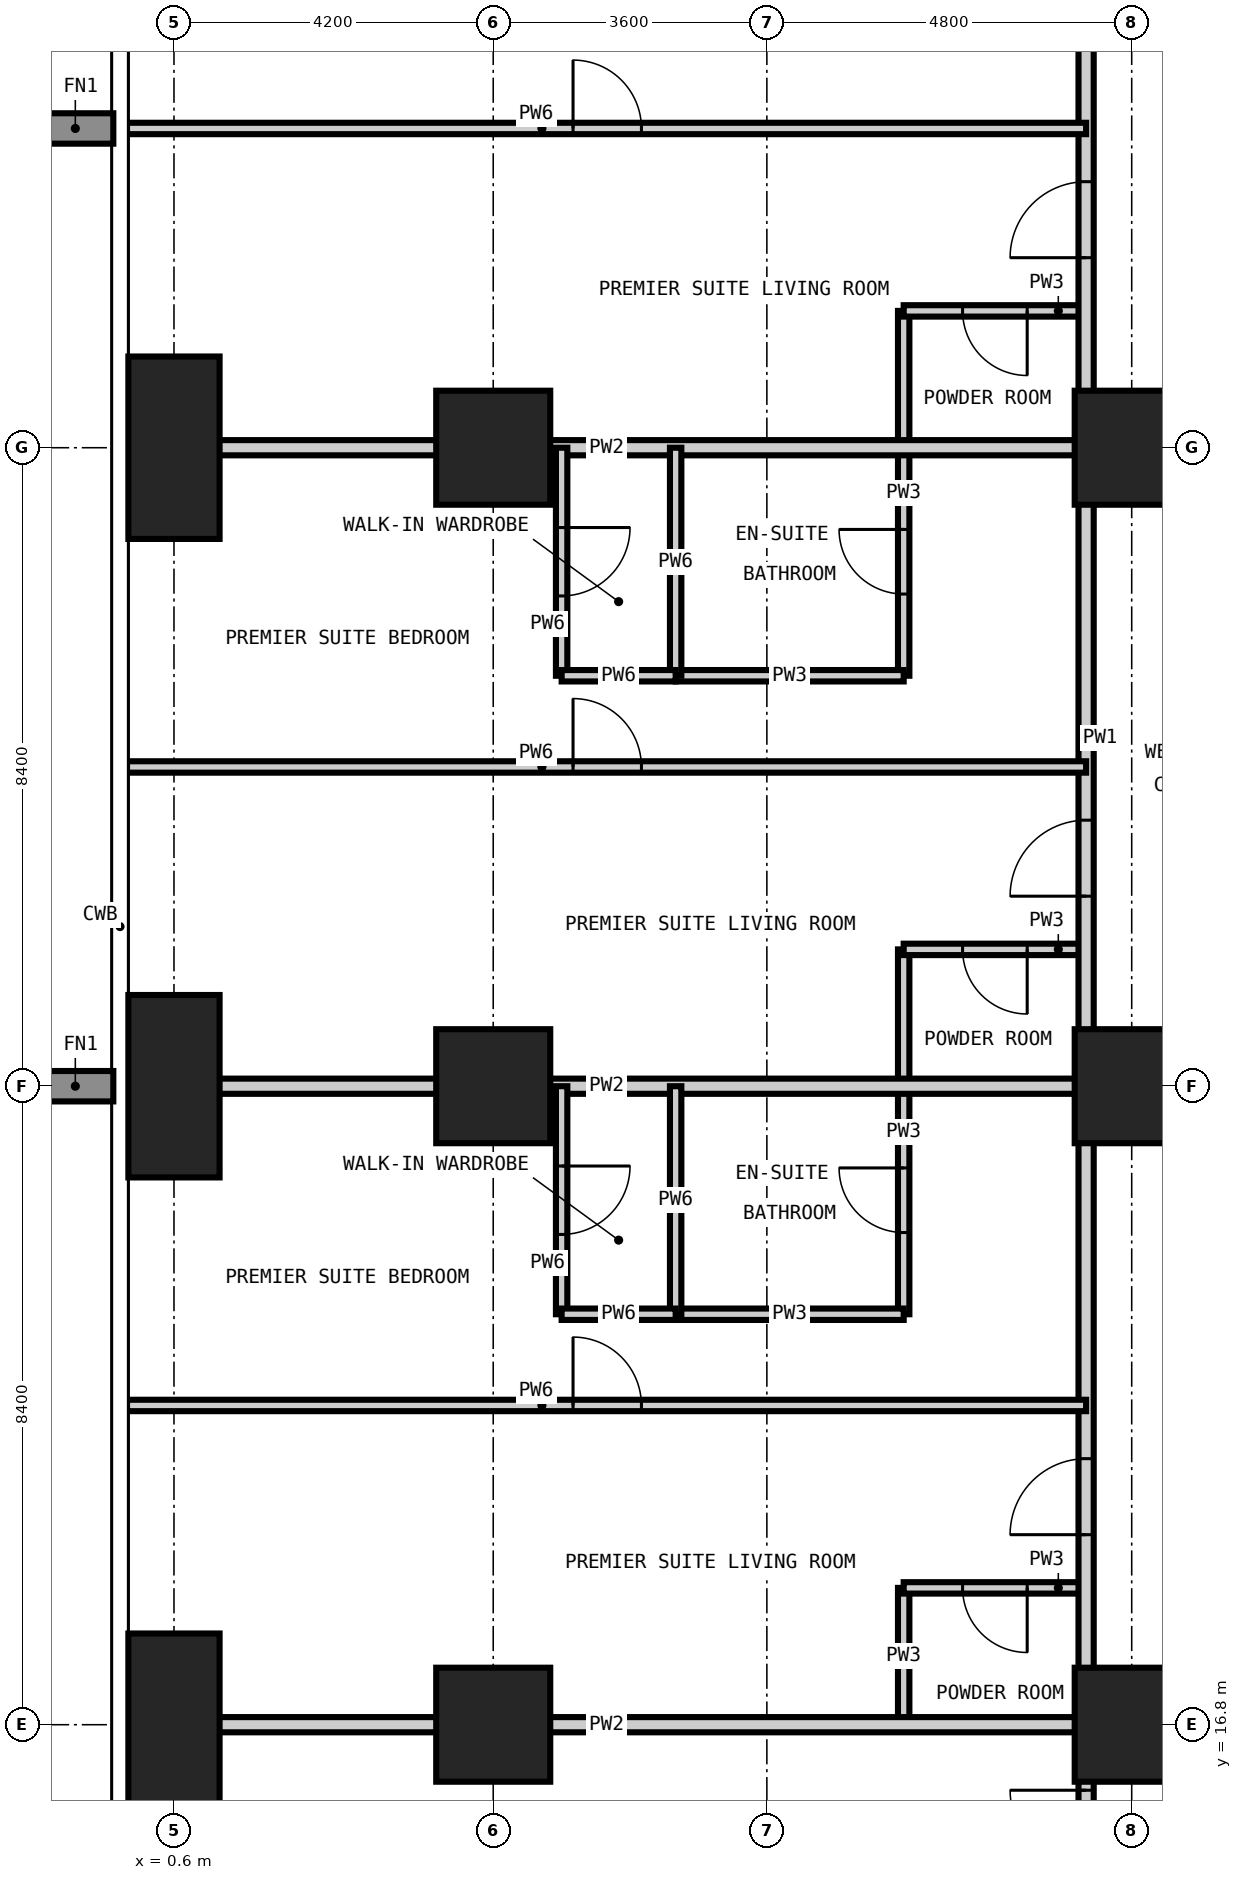
"""IFC4 building model, lengths in metres.
Left out: names, types, materials, properties, quantities, classifications, styles, units other than length and angle.
Written with IfcOpenShell. Run it as: python <this file> out.ifc"""

import sys

from ifc_helpers import new_model, si_unit, direction, frame, frame_2d, origin, origin_2d, place, context, subcontext, project, spatial, rectangle, extrude, element, fill, save


model = new_model("IFC4")
c1 = context("Model", 3, precision=1e-05, world=origin(), true_north=direction((0.0, 1.0)))
c2 = subcontext(c1, "Body", "Model", "MODEL_VIEW")
j1 = project(units=[si_unit("LENGTHUNIT", "METRE"), si_unit("PLANEANGLEUNIT", "RADIAN")], contexts=[c1])
p1 = place(None, origin())
s1 = spatial("IfcSite", under=j1, at=p1, CompositionType="ELEMENT")
p2 = place(p1, origin())
s2 = spatial("IfcBuilding", under=s1, at=p2, CompositionType="ELEMENT")
p3 = place(p2, frame((0.0, 0.0, 100.8)))
s3 = spatial("IfcBuildingStorey", under=s2, at=p3, CompositionType="ELEMENT", Elevation=100.8)
for number, where, z_axis, x_axis in (
    (1, (0.6, 16.8, -0.35), (0.0, 0.0, 1.0), (1.0, 0.0, 0.0)),
    (2, (0.6, 25.2, -0.35), (0.0, 0.0, 1.0), (1.0, 0.0, 0.0)),
    (3, (0.6, 33.6, -0.35), (0.0, 0.0, 1.0), (1.0, 0.0, 0.0)),
):
    element("IfcColumn", number, at=place(p3, frame(where, z_axis=z_axis, x_axis=x_axis)), inside=s3, PredefinedType="COLUMN", context=c2, shape_type="SweptSolid", body=[
        extrude(rectangle(XDim=1.2, YDim=2.4, at=origin_2d()), origin(), (0.0, 0.0, 1.0), 3.6),
    ])
for number, where, z_axis, x_axis in (
    (4, (4.8, 16.8, -0.35), (0.0, 0.0, 1.0), (1.0, 0.0, 0.0)),
    (5, (4.8, 25.2, -0.35), (0.0, 0.0, 1.0), (1.0, 0.0, 0.0)),
    (6, (4.8, 33.6, -0.35), (0.0, 0.0, 1.0), (1.0, 0.0, 0.0)),
    (7, (13.2, 16.8, -0.35), (0.0, 0.0, 1.0), (1.0, 0.0, 0.0)),
    (8, (13.2, 25.2, -0.35), (0.0, 0.0, 1.0), (1.0, 0.0, 0.0)),
    (9, (13.2, 33.6, -0.35), (0.0, 0.0, 1.0), (1.0, 0.0, 0.0)),
):
    element("IfcColumn", number, at=place(p3, frame(where, z_axis=z_axis, x_axis=x_axis)), inside=s3, PredefinedType="COLUMN", context=c2, shape_type="SweptSolid", body=[
        extrude(rectangle(XDim=1.5, YDim=1.5, at=origin_2d()), origin(), (0.0, 0.0, 1.0), 3.6),
    ])
p4 = place(p3, frame((10.2, 16.8, 0.0), z_axis=(0.0, 0.0, 1.0), x_axis=(0.0, 1.0, 0.0)))
e10 = element("IfcWall", 10, at=p4, inside=s3, PredefinedType="PARTITIONING", context=c2, shape_type="SweptSolid", body=[
    extrude(rectangle(XDim=1.8, YDim=0.15, at=frame_2d((0.9, 0.0))), origin(), (0.0, 0.0, 1.0), 3.25),
])
p5 = place(p3, frame((10.2, 22.2, 0.0), z_axis=(0.0, 0.0, 1.0), x_axis=(0.0, 1.0, 0.0)))
e11 = element("IfcWall", 11, at=p5, inside=s3, PredefinedType="PARTITIONING", context=c2, shape_type="SweptSolid", body=[
    extrude(rectangle(XDim=4.8, YDim=0.15, at=frame_2d((2.4, 0.0))), origin(), (0.0, 0.0, 1.0), 3.25),
])
p6 = place(p5, frame((1.075, 0.0, 0.0)))
e12 = element("IfcOpeningElement", 12, at=p6, cuts=e11, PredefinedType="OPENING", context=c2, shape_type="SweptSolid", body=[
    extrude(rectangle(XDim=0.85, YDim=2.1, at=frame_2d((0.425, 1.05))), frame((0.0, 0.085, 0.0), z_axis=(0.0, -1.0, 0.0), x_axis=(1.0, 0.0, 0.0)), (0.0, 0.0, 1.0), 0.17),
])
p7 = place(p3, frame((10.2, 30.6, 0.0), z_axis=(0.0, 0.0, 1.0), x_axis=(0.0, 1.0, 0.0)))
e13 = element("IfcWall", 13, at=p7, inside=s3, PredefinedType="PARTITIONING", context=c2, shape_type="SweptSolid", body=[
    extrude(rectangle(XDim=4.8, YDim=0.15, at=frame_2d((2.4, 0.0))), origin(), (0.0, 0.0, 1.0), 3.25),
])
p8 = place(p7, frame((1.075, 0.0, 0.0)))
e14 = element("IfcOpeningElement", 14, at=p8, cuts=e13, PredefinedType="OPENING", context=c2, shape_type="SweptSolid", body=[
    extrude(rectangle(XDim=0.85, YDim=2.1, at=frame_2d((0.425, 1.05))), frame((0.0, 0.085, 0.0), z_axis=(0.0, -1.0, 0.0), x_axis=(1.0, 0.0, 0.0)), (0.0, 0.0, 1.0), 0.17),
])
p9 = place(p3, frame((10.2, 18.6, 0.0), z_axis=(0.0, 0.0, 1.0), x_axis=(1.0, 0.0, 0.0)))
e15 = element("IfcWall", 15, at=p9, inside=s3, PredefinedType="PARTITIONING", context=c2, shape_type="SweptSolid", body=[
    extrude(rectangle(XDim=2.4, YDim=0.15, at=frame_2d((1.2, 0.0))), origin(), (0.0, 0.0, 1.0), 3.25),
])
p10 = place(p9, frame((0.775, 0.0, 0.0)))
e16 = element("IfcOpeningElement", 16, at=p10, cuts=e15, PredefinedType="OPENING", context=c2, shape_type="SweptSolid", body=[
    extrude(rectangle(XDim=0.85, YDim=2.1, at=frame_2d((0.425, 1.05))), frame((0.0, 0.085, 0.0), z_axis=(0.0, -1.0, 0.0), x_axis=(1.0, 0.0, 0.0)), (0.0, 0.0, 1.0), 0.17),
])
p11 = place(p3, frame((7.2, 22.2, 0.0), z_axis=(0.0, 0.0, 1.0), x_axis=(1.0, 0.0, 0.0)))
e17 = element("IfcWall", 17, at=p11, inside=s3, PredefinedType="PARTITIONING", context=c2, shape_type="SweptSolid", body=[
    extrude(rectangle(XDim=3.0, YDim=0.15, at=frame_2d((1.5, 0.0))), origin(), (0.0, 0.0, 1.0), 3.25),
])
p12 = place(p3, frame((10.2, 27.0, 0.0), z_axis=(0.0, 0.0, 1.0), x_axis=(1.0, 0.0, 0.0)))
e18 = element("IfcWall", 18, at=p12, inside=s3, PredefinedType="PARTITIONING", context=c2, shape_type="SweptSolid", body=[
    extrude(rectangle(XDim=2.4, YDim=0.15, at=frame_2d((1.2, 0.0))), origin(), (0.0, 0.0, 1.0), 3.25),
])
p13 = place(p12, frame((0.775, 0.0, 0.0)))
e19 = element("IfcOpeningElement", 19, at=p13, cuts=e18, PredefinedType="OPENING", context=c2, shape_type="SweptSolid", body=[
    extrude(rectangle(XDim=0.85, YDim=2.1, at=frame_2d((0.425, 1.05))), frame((0.0, 0.085, 0.0), z_axis=(0.0, -1.0, 0.0), x_axis=(1.0, 0.0, 0.0)), (0.0, 0.0, 1.0), 0.17),
])
p14 = place(p3, frame((7.2, 30.6, 0.0), z_axis=(0.0, 0.0, 1.0), x_axis=(1.0, 0.0, 0.0)))
e20 = element("IfcWall", 20, at=p14, inside=s3, PredefinedType="PARTITIONING", context=c2, shape_type="SweptSolid", body=[
    extrude(rectangle(XDim=3.0, YDim=0.15, at=frame_2d((1.5, 0.0))), origin(), (0.0, 0.0, 1.0), 3.25),
])
p15 = place(p3, frame((10.2, 35.4, 0.0), z_axis=(0.0, 0.0, 1.0), x_axis=(1.0, 0.0, 0.0)))
e21 = element("IfcWall", 21, at=p15, inside=s3, PredefinedType="PARTITIONING", context=c2, shape_type="SweptSolid", body=[
    extrude(rectangle(XDim=2.4, YDim=0.15, at=frame_2d((1.2, 0.0))), origin(), (0.0, 0.0, 1.0), 3.25),
])
p16 = place(p15, frame((0.775, 0.0, 0.0)))
e22 = element("IfcOpeningElement", 22, at=p16, cuts=e21, PredefinedType="OPENING", context=c2, shape_type="SweptSolid", body=[
    extrude(rectangle(XDim=0.85, YDim=2.1, at=frame_2d((0.425, 1.05))), frame((0.0, 0.085, 0.0), z_axis=(0.0, -1.0, 0.0), x_axis=(1.0, 0.0, 0.0)), (0.0, 0.0, 1.0), 0.17),
])
p17 = place(p3, frame((12.6, 14.075, 0.0), z_axis=(0.0, 0.0, 1.0), x_axis=(0.0, 1.0, 0.0)))
e23 = element("IfcWall", 23, at=p17, inside=s3, PredefinedType="PARTITIONING", context=c2, shape_type="SweptSolid", body=[
    extrude(rectangle(XDim=31.25, YDim=0.2, at=frame_2d((15.625, 0.0))), origin(), (0.0, 0.0, 1.0), 3.25),
])
p18 = place(p17, frame((5.225, 0.0, 0.0)))
e24 = element("IfcOpeningElement", 24, at=p18, cuts=e23, PredefinedType="OPENING", context=c2, shape_type="SweptSolid", body=[
    extrude(rectangle(XDim=1.0, YDim=2.2, at=frame_2d((0.5, 1.1))), frame((0.0, 0.11, 0.0), z_axis=(0.0, -1.0, 0.0), x_axis=(1.0, 0.0, 0.0)), (0.0, 0.0, 1.0), 0.22),
])
p19 = place(p17, frame((13.625, 0.0, 0.0)))
e25 = element("IfcOpeningElement", 25, at=p19, cuts=e23, PredefinedType="OPENING", context=c2, shape_type="SweptSolid", body=[
    extrude(rectangle(XDim=1.0, YDim=2.2, at=frame_2d((0.5, 1.1))), frame((0.0, 0.11, 0.0), z_axis=(0.0, -1.0, 0.0), x_axis=(1.0, 0.0, 0.0)), (0.0, 0.0, 1.0), 0.22),
])
p20 = place(p17, frame((22.025, 0.0, 0.0)))
e26 = element("IfcOpeningElement", 26, at=p20, cuts=e23, PredefinedType="OPENING", context=c2, shape_type="SweptSolid", body=[
    extrude(rectangle(XDim=1.0, YDim=2.2, at=frame_2d((0.5, 1.1))), frame((0.0, 0.11, 0.0), z_axis=(0.0, -1.0, 0.0), x_axis=(1.0, 0.0, 0.0)), (0.0, 0.0, 1.0), 0.22),
])
p21 = place(p17, frame((0.863, 0.0, 0.0)))
e27 = element("IfcOpeningElement", 27, at=p21, cuts=e23, PredefinedType="OPENING", context=c2, shape_type="SweptSolid", body=[
    extrude(rectangle(XDim=1.0, YDim=2.2, at=frame_2d((0.5, 1.1))), frame((0.0, 0.11, 0.0), z_axis=(0.0, -1.0, 0.0), x_axis=(1.0, 0.0, 0.0)), (0.0, 0.0, 1.0), 0.22),
])
p22 = place(p17, frame((29.088, 0.0, 0.0)))
e28 = element("IfcOpeningElement", 28, at=p22, cuts=e23, PredefinedType="OPENING", context=c2, shape_type="SweptSolid", body=[
    extrude(rectangle(XDim=1.0, YDim=2.2, at=frame_2d((0.5, 1.1))), frame((0.0, 0.11, 0.0), z_axis=(0.0, -1.0, 0.0), x_axis=(1.0, 0.0, 0.0)), (0.0, 0.0, 1.0), 0.22),
])
for number, where, z_axis, x_axis in (
    (29, (-0.018, 16.8, 0.0), (0.0, 0.0, 1.0), (1.0, 0.0, 0.0)),
    (30, (-0.018, 25.2, 0.0), (0.0, 0.0, 1.0), (1.0, 0.0, 0.0)),
    (31, (-0.018, 33.6, 0.0), (0.0, 0.0, 1.0), (1.0, 0.0, 0.0)),
):
    element("IfcWall", number, at=place(p3, frame(where, z_axis=z_axis, x_axis=x_axis)), inside=s3, PredefinedType="PARTITIONING", context=c2, shape_type="SweptSolid", body=[
        extrude(rectangle(XDim=12.618, YDim=0.2, at=frame_2d((6.309, 0.0))), origin(), (0.0, 0.0, 1.0), 3.25),
    ])
p23 = place(p3, frame((5.7, 22.2, 0.0), z_axis=(0.0, 0.0, 1.0), x_axis=(0.0, 1.0, 0.0)))
e32 = element("IfcWall", 32, at=p23, inside=s3, PredefinedType="PARTITIONING", context=c2, shape_type="SweptSolid", body=[
    extrude(rectangle(XDim=3.0, YDim=0.15, at=frame_2d((1.5, 0.0))), origin(), (0.0, 0.0, 1.0), 3.25),
])
p24 = place(p23, frame((1.05, 0.0, 0.0)))
e33 = element("IfcOpeningElement", 33, at=p24, cuts=e32, PredefinedType="OPENING", context=c2, shape_type="SweptSolid", body=[
    extrude(rectangle(XDim=0.9, YDim=2.1, at=frame_2d((0.45, 1.05))), frame((0.0, 0.085, 0.0), z_axis=(0.0, -1.0, 0.0), x_axis=(1.0, 0.0, 0.0)), (0.0, 0.0, 1.0), 0.17),
])
p25 = place(p3, frame((5.7, 30.6, 0.0), z_axis=(0.0, 0.0, 1.0), x_axis=(0.0, 1.0, 0.0)))
e34 = element("IfcWall", 34, at=p25, inside=s3, PredefinedType="PARTITIONING", context=c2, shape_type="SweptSolid", body=[
    extrude(rectangle(XDim=3.0, YDim=0.15, at=frame_2d((1.5, 0.0))), origin(), (0.0, 0.0, 1.0), 3.25),
])
p26 = place(p25, frame((1.05, 0.0, 0.0)))
e35 = element("IfcOpeningElement", 35, at=p26, cuts=e34, PredefinedType="OPENING", context=c2, shape_type="SweptSolid", body=[
    extrude(rectangle(XDim=0.9, YDim=2.1, at=frame_2d((0.45, 1.05))), frame((0.0, 0.085, 0.0), z_axis=(0.0, -1.0, 0.0), x_axis=(1.0, 0.0, 0.0)), (0.0, 0.0, 1.0), 0.17),
])
for number, where, z_axis, x_axis in (
    (36, (7.2, 22.2, 0.0), (0.0, 0.0, 1.0), (0.0, 1.0, 0.0)),
    (37, (7.2, 30.6, 0.0), (0.0, 0.0, 1.0), (0.0, 1.0, 0.0)),
):
    element("IfcWall", number, at=place(p3, frame(where, z_axis=z_axis, x_axis=x_axis)), inside=s3, PredefinedType="PARTITIONING", context=c2, shape_type="SweptSolid", body=[
        extrude(rectangle(XDim=3.0, YDim=0.15, at=frame_2d((1.5, 0.0))), origin(), (0.0, 0.0, 1.0), 3.25),
    ])
p27 = place(p3, frame((-0.018, 21.0, 0.0), z_axis=(0.0, 0.0, 1.0), x_axis=(1.0, 0.0, 0.0)))
e38 = element("IfcWall", 38, at=p27, inside=s3, PredefinedType="PARTITIONING", context=c2, shape_type="SweptSolid", body=[
    extrude(rectangle(XDim=12.618, YDim=0.15, at=frame_2d((6.309, 0.0))), origin(), (0.0, 0.0, 1.0), 3.25),
])
p28 = place(p27, frame((5.868, 0.0, 0.0)))
e39 = element("IfcOpeningElement", 39, at=p28, cuts=e38, PredefinedType="OPENING", context=c2, shape_type="SweptSolid", body=[
    extrude(rectangle(XDim=0.9, YDim=2.1, at=frame_2d((0.45, 1.05))), frame((0.0, 0.085, 0.0), z_axis=(0.0, -1.0, 0.0), x_axis=(1.0, 0.0, 0.0)), (0.0, 0.0, 1.0), 0.17),
])
p29 = place(p3, frame((5.7, 22.2, 0.0), z_axis=(0.0, 0.0, 1.0), x_axis=(1.0, 0.0, 0.0)))
e40 = element("IfcWall", 40, at=p29, inside=s3, PredefinedType="PARTITIONING", context=c2, shape_type="SweptSolid", body=[
    extrude(rectangle(XDim=1.5, YDim=0.15, at=frame_2d((0.75, 0.0))), origin(), (0.0, 0.0, 1.0), 3.25),
])
p30 = place(p3, frame((-0.018, 29.4, 0.0), z_axis=(0.0, 0.0, 1.0), x_axis=(1.0, 0.0, 0.0)))
e41 = element("IfcWall", 41, at=p30, inside=s3, PredefinedType="PARTITIONING", context=c2, shape_type="SweptSolid", body=[
    extrude(rectangle(XDim=12.618, YDim=0.15, at=frame_2d((6.309, 0.0))), origin(), (0.0, 0.0, 1.0), 3.25),
])
p31 = place(p30, frame((5.868, 0.0, 0.0)))
e42 = element("IfcOpeningElement", 42, at=p31, cuts=e41, PredefinedType="OPENING", context=c2, shape_type="SweptSolid", body=[
    extrude(rectangle(XDim=0.9, YDim=2.1, at=frame_2d((0.45, 1.05))), frame((0.0, 0.085, 0.0), z_axis=(0.0, -1.0, 0.0), x_axis=(1.0, 0.0, 0.0)), (0.0, 0.0, 1.0), 0.17),
])
p32 = place(p3, frame((5.7, 30.6, 0.0), z_axis=(0.0, 0.0, 1.0), x_axis=(1.0, 0.0, 0.0)))
e43 = element("IfcWall", 43, at=p32, inside=s3, PredefinedType="PARTITIONING", context=c2, shape_type="SweptSolid", body=[
    extrude(rectangle(XDim=1.5, YDim=0.15, at=frame_2d((0.75, 0.0))), origin(), (0.0, 0.0, 1.0), 3.25),
])
p33 = place(p3, frame((-0.018, 37.8, 0.0), z_axis=(0.0, 0.0, 1.0), x_axis=(1.0, 0.0, 0.0)))
e44 = element("IfcWall", 44, at=p33, inside=s3, PredefinedType="PARTITIONING", context=c2, shape_type="SweptSolid", body=[
    extrude(rectangle(XDim=12.618, YDim=0.15, at=frame_2d((6.309, 0.0))), origin(), (0.0, 0.0, 1.0), 3.25),
])
p34 = place(p33, frame((5.868, 0.0, 0.0)))
e45 = element("IfcOpeningElement", 45, at=p34, cuts=e44, PredefinedType="OPENING", context=c2, shape_type="SweptSolid", body=[
    extrude(rectangle(XDim=0.9, YDim=2.1, at=frame_2d((0.45, 1.05))), frame((0.0, 0.085, 0.0), z_axis=(0.0, -1.0, 0.0), x_axis=(1.0, 0.0, 0.0)), (0.0, 0.0, 1.0), 0.17),
])
p35 = place(p18, origin())
e46 = element("IfcDoor", 46, at=p35, inside=s3, OperationType="SINGLE_SWING_LEFT", PredefinedType="DOOR", context=c2, shape_type="SweptSolid", body=[
    extrude(rectangle(XDim=1.0, YDim=2.2, at=frame_2d((0.5, 1.1))), frame((0.0, 0.025, 0.0), z_axis=(0.0, -1.0, 0.0), x_axis=(1.0, 0.0, 0.0)), (0.0, 0.0, 1.0), 0.05),
])
fill(e24, e46)
p36 = place(p10, frame((0.85, 0.0, 0.0), z_axis=(0.0, 0.0, 1.0), x_axis=(-1.0, 0.0, 0.0)))
e47 = element("IfcDoor", 47, at=p36, inside=s3, OperationType="SINGLE_SWING_LEFT", PredefinedType="DOOR", context=c2, shape_type="SweptSolid", body=[
    extrude(rectangle(XDim=0.85, YDim=2.1, at=frame_2d((0.425, 1.05))), frame((0.0, 0.025, 0.0), z_axis=(0.0, -1.0, 0.0), x_axis=(1.0, 0.0, 0.0)), (0.0, 0.0, 1.0), 0.05),
])
fill(e16, e47)
p37 = place(p28, origin())
e48 = element("IfcDoor", 48, at=p37, inside=s3, OperationType="SINGLE_SWING_LEFT", PredefinedType="DOOR", context=c2, shape_type="SweptSolid", body=[
    extrude(rectangle(XDim=0.9, YDim=2.1, at=frame_2d((0.45, 1.05))), frame((0.0, 0.025, 0.0), z_axis=(0.0, -1.0, 0.0), x_axis=(1.0, 0.0, 0.0)), (0.0, 0.0, 1.0), 0.05),
])
fill(e39, e48)
p38 = place(p6, origin())
e49 = element("IfcDoor", 49, at=p38, inside=s3, OperationType="SINGLE_SWING_RIGHT", PredefinedType="DOOR", context=c2, shape_type="SweptSolid", body=[
    extrude(rectangle(XDim=0.85, YDim=2.1, at=frame_2d((0.425, 1.05))), frame((0.0, 0.025, 0.0), z_axis=(0.0, -1.0, 0.0), x_axis=(1.0, 0.0, 0.0)), (0.0, 0.0, 1.0), 0.05),
])
fill(e12, e49)
p39 = place(p24, frame((0.9, 0.0, 0.0), z_axis=(0.0, 0.0, 1.0), x_axis=(-1.0, 0.0, 0.0)))
e50 = element("IfcDoor", 50, at=p39, inside=s3, OperationType="SINGLE_SWING_LEFT", PredefinedType="DOOR", context=c2, shape_type="SweptSolid", body=[
    extrude(rectangle(XDim=0.9, YDim=2.1, at=frame_2d((0.45, 1.05))), frame((0.0, 0.025, 0.0), z_axis=(0.0, -1.0, 0.0), x_axis=(1.0, 0.0, 0.0)), (0.0, 0.0, 1.0), 0.05),
])
fill(e33, e50)
p40 = place(p19, origin())
e51 = element("IfcDoor", 51, at=p40, inside=s3, OperationType="SINGLE_SWING_LEFT", PredefinedType="DOOR", context=c2, shape_type="SweptSolid", body=[
    extrude(rectangle(XDim=1.0, YDim=2.2, at=frame_2d((0.5, 1.1))), frame((0.0, 0.025, 0.0), z_axis=(0.0, -1.0, 0.0), x_axis=(1.0, 0.0, 0.0)), (0.0, 0.0, 1.0), 0.05),
])
fill(e25, e51)
p41 = place(p13, frame((0.85, 0.0, 0.0), z_axis=(0.0, 0.0, 1.0), x_axis=(-1.0, 0.0, 0.0)))
e52 = element("IfcDoor", 52, at=p41, inside=s3, OperationType="SINGLE_SWING_LEFT", PredefinedType="DOOR", context=c2, shape_type="SweptSolid", body=[
    extrude(rectangle(XDim=0.85, YDim=2.1, at=frame_2d((0.425, 1.05))), frame((0.0, 0.025, 0.0), z_axis=(0.0, -1.0, 0.0), x_axis=(1.0, 0.0, 0.0)), (0.0, 0.0, 1.0), 0.05),
])
fill(e19, e52)
p42 = place(p31, origin())
e53 = element("IfcDoor", 53, at=p42, inside=s3, OperationType="SINGLE_SWING_LEFT", PredefinedType="DOOR", context=c2, shape_type="SweptSolid", body=[
    extrude(rectangle(XDim=0.9, YDim=2.1, at=frame_2d((0.45, 1.05))), frame((0.0, 0.025, 0.0), z_axis=(0.0, -1.0, 0.0), x_axis=(1.0, 0.0, 0.0)), (0.0, 0.0, 1.0), 0.05),
])
fill(e42, e53)
p43 = place(p8, origin())
e54 = element("IfcDoor", 54, at=p43, inside=s3, OperationType="SINGLE_SWING_RIGHT", PredefinedType="DOOR", context=c2, shape_type="SweptSolid", body=[
    extrude(rectangle(XDim=0.85, YDim=2.1, at=frame_2d((0.425, 1.05))), frame((0.0, 0.025, 0.0), z_axis=(0.0, -1.0, 0.0), x_axis=(1.0, 0.0, 0.0)), (0.0, 0.0, 1.0), 0.05),
])
fill(e14, e54)
p44 = place(p26, frame((0.9, 0.0, 0.0), z_axis=(0.0, 0.0, 1.0), x_axis=(-1.0, 0.0, 0.0)))
e55 = element("IfcDoor", 55, at=p44, inside=s3, OperationType="SINGLE_SWING_LEFT", PredefinedType="DOOR", context=c2, shape_type="SweptSolid", body=[
    extrude(rectangle(XDim=0.9, YDim=2.1, at=frame_2d((0.45, 1.05))), frame((0.0, 0.025, 0.0), z_axis=(0.0, -1.0, 0.0), x_axis=(1.0, 0.0, 0.0)), (0.0, 0.0, 1.0), 0.05),
])
fill(e35, e55)
p45 = place(p20, origin())
e56 = element("IfcDoor", 56, at=p45, inside=s3, OperationType="SINGLE_SWING_LEFT", PredefinedType="DOOR", context=c2, shape_type="SweptSolid", body=[
    extrude(rectangle(XDim=1.0, YDim=2.2, at=frame_2d((0.5, 1.1))), frame((0.0, 0.025, 0.0), z_axis=(0.0, -1.0, 0.0), x_axis=(1.0, 0.0, 0.0)), (0.0, 0.0, 1.0), 0.05),
])
fill(e26, e56)
p46 = place(p16, frame((0.85, 0.0, 0.0), z_axis=(0.0, 0.0, 1.0), x_axis=(-1.0, 0.0, 0.0)))
e57 = element("IfcDoor", 57, at=p46, inside=s3, OperationType="SINGLE_SWING_LEFT", PredefinedType="DOOR", context=c2, shape_type="SweptSolid", body=[
    extrude(rectangle(XDim=0.85, YDim=2.1, at=frame_2d((0.425, 1.05))), frame((0.0, 0.025, 0.0), z_axis=(0.0, -1.0, 0.0), x_axis=(1.0, 0.0, 0.0)), (0.0, 0.0, 1.0), 0.05),
])
fill(e22, e57)
p47 = place(p34, origin())
e58 = element("IfcDoor", 58, at=p47, inside=s3, OperationType="SINGLE_SWING_LEFT", PredefinedType="DOOR", context=c2, shape_type="SweptSolid", body=[
    extrude(rectangle(XDim=0.9, YDim=2.1, at=frame_2d((0.45, 1.05))), frame((0.0, 0.025, 0.0), z_axis=(0.0, -1.0, 0.0), x_axis=(1.0, 0.0, 0.0)), (0.0, 0.0, 1.0), 0.05),
])
fill(e45, e58)
p48 = place(p21, origin())
e59 = element("IfcDoor", 59, at=p48, inside=s3, OperationType="SINGLE_SWING_RIGHT", PredefinedType="DOOR", context=c2, shape_type="SweptSolid", body=[
    extrude(rectangle(XDim=1.0, YDim=2.2, at=frame_2d((0.5, 1.1))), frame((0.0, 0.025, 0.0), z_axis=(0.0, -1.0, 0.0), x_axis=(1.0, 0.0, 0.0)), (0.0, 0.0, 1.0), 0.05),
])
fill(e27, e59)
save(model, sys.argv[1])
